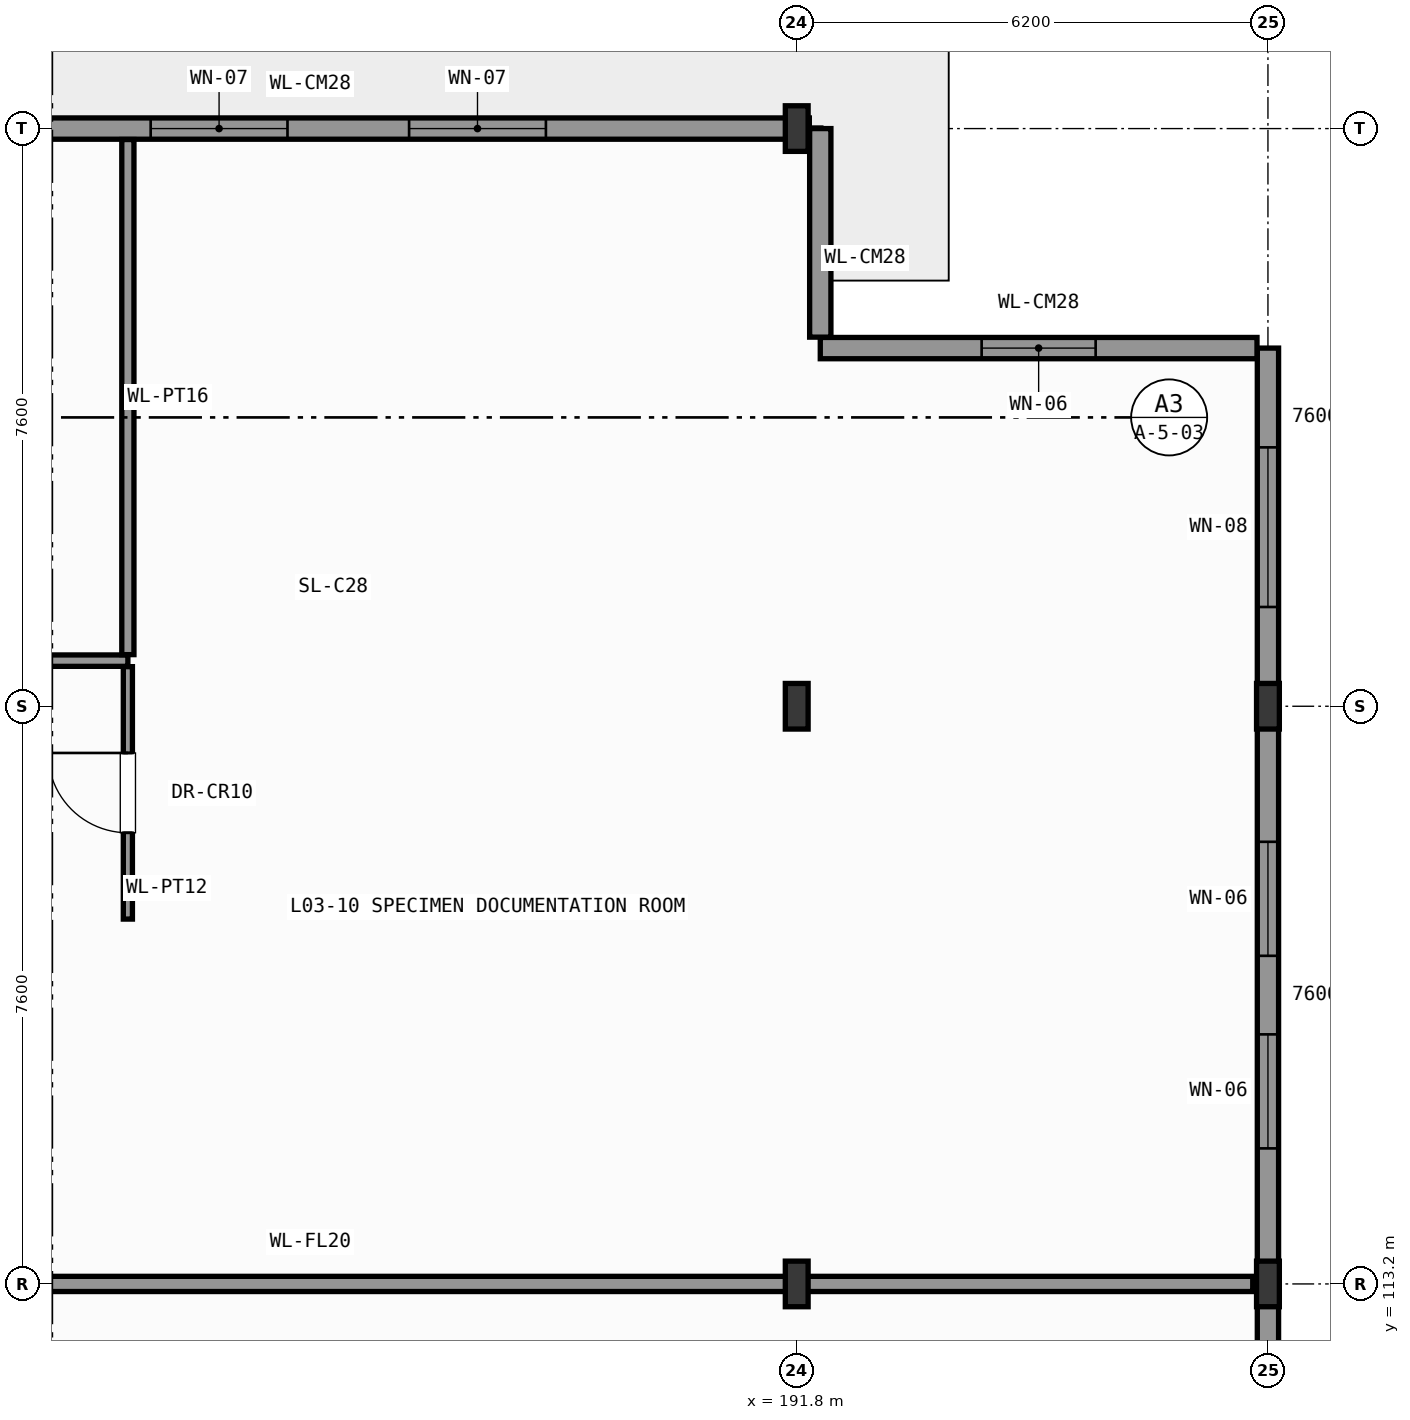
"""IFC4 building model, lengths in metres.
Left out: names, types, materials, properties, quantities, classifications, styles, units other than length and angle.
Written with IfcOpenShell. Run it as: python <this file> out.ifc"""

import sys

from ifc_helpers import new_model, si_unit, direction, frame, frame_2d, origin, origin_2d, place, context, subcontext, project, spatial, rectangle, i_section, extrude, element, fill, save


model = new_model("IFC4")
c1 = context("Model", 3, precision=1e-05, world=origin(), true_north=direction((0.0, 1.0)))
c2 = subcontext(c1, "Body", "Model", "MODEL_VIEW")
j1 = project(units=[si_unit("LENGTHUNIT", "METRE"), si_unit("PLANEANGLEUNIT", "RADIAN")], contexts=[c1])
p1 = place(None, origin())
s1 = spatial("IfcSite", under=j1, at=p1, CompositionType="ELEMENT")
p2 = place(p1, origin())
s2 = spatial("IfcBuilding", under=s1, at=p2, CompositionType="ELEMENT")
p3 = place(p2, frame((0.0, 0.0, 13.2)))
s3 = spatial("IfcBuildingStorey", under=s2, at=p3, CompositionType="ELEMENT", Elevation=13.2)
for number, where, z_axis, x_axis in (
    (1, (191.8, 113.2, 0.0), (0.0, 0.0, 1.0), (1.0, 0.0, 0.0)),
    (2, (191.8, 120.8, 0.0), (0.0, 0.0, 1.0), (1.0, 0.0, 0.0)),
    (3, (191.8, 128.4, 0.0), (0.0, 0.0, 1.0), (1.0, 0.0, 0.0)),
    (4, (198.0, 113.2, 0.0), (0.0, 0.0, 1.0), (1.0, 0.0, 0.0)),
    (5, (198.0, 120.8, 0.0), (0.0, 0.0, 1.0), (1.0, 0.0, 0.0)),
):
    element("IfcColumn", number, at=place(p3, frame(where, z_axis=z_axis, x_axis=x_axis)), inside=s3, PredefinedType="COLUMN", context=c2, shape_type="SweptSolid", body=[
        extrude(i_section(OverallWidth=0.3, OverallDepth=0.6, WebThickness=0.015, FlangeThickness=0.03, FilletRadius=0.027, at=origin_2d()), origin(), (0.0, 0.0, 1.0), 4.8),
    ])
p4 = place(p3, frame((198.0, 113.2, 0.0), z_axis=(0.0, 0.0, 1.0), x_axis=(0.0, -1.0, 0.0)))
e6 = element("IfcWall", 6, at=p4, inside=s3, PredefinedType="SOLIDWALL", context=c2, shape_type="SweptSolid", body=[
    extrude(rectangle(XDim=7.6, YDim=0.28, at=frame_2d((3.8, 0.0))), origin(), (0.0, 0.0, 1.0), 4.215),
])
p5 = place(p4, frame((1.633, 0.0, 0.95)))
e7 = element("IfcOpeningElement", 7, at=p5, cuts=e6, PredefinedType="OPENING", context=c2, shape_type="SweptSolid", body=[
    extrude(rectangle(XDim=1.8, YDim=2.6, at=frame_2d((0.9, 1.3))), frame((0.0, 0.15, 0.0), z_axis=(0.0, -1.0, 0.0), x_axis=(1.0, 0.0, 0.0)), (0.0, 0.0, 1.0), 0.3),
])
p6 = place(p4, frame((4.167, 0.0, 0.95)))
e8 = element("IfcOpeningElement", 8, at=p6, cuts=e6, PredefinedType="OPENING", context=c2, shape_type="SweptSolid", body=[
    extrude(rectangle(XDim=1.8, YDim=2.6, at=frame_2d((0.9, 1.3))), frame((0.0, 0.15, 0.0), z_axis=(0.0, -1.0, 0.0), x_axis=(1.0, 0.0, 0.0)), (0.0, 0.0, 1.0), 0.3),
])
p7 = place(p3, frame((198.0, 120.8, 0.0), z_axis=(0.0, 0.0, 1.0), x_axis=(0.0, -1.0, 0.0)))
e9 = element("IfcWall", 9, at=p7, inside=s3, PredefinedType="SOLIDWALL", context=c2, shape_type="SweptSolid", body=[
    extrude(rectangle(XDim=7.6, YDim=0.28, at=frame_2d((3.8, 0.0))), origin(), (0.0, 0.0, 1.0), 4.56),
])
p8 = place(p7, frame((1.783, 0.0, 0.95)))
e10 = element("IfcOpeningElement", 10, at=p8, cuts=e9, PredefinedType="OPENING", context=c2, shape_type="SweptSolid", body=[
    extrude(rectangle(XDim=1.5, YDim=2.4, at=frame_2d((0.75, 1.2))), frame((0.0, 0.15, 0.0), z_axis=(0.0, -1.0, 0.0), x_axis=(1.0, 0.0, 0.0)), (0.0, 0.0, 1.0), 0.3),
])
p9 = place(p7, frame((4.317, 0.0, 0.95)))
e11 = element("IfcOpeningElement", 11, at=p9, cuts=e9, PredefinedType="OPENING", context=c2, shape_type="SweptSolid", body=[
    extrude(rectangle(XDim=1.5, YDim=2.4, at=frame_2d((0.75, 1.2))), frame((0.0, 0.15, 0.0), z_axis=(0.0, -1.0, 0.0), x_axis=(1.0, 0.0, 0.0)), (0.0, 0.0, 1.0), 0.3),
])
p10 = place(p3, frame((198.0, 125.512, 0.0), z_axis=(0.0, 0.0, 1.0), x_axis=(0.0, -1.0, 0.0)))
e12 = element("IfcWall", 12, at=p10, inside=s3, PredefinedType="SOLIDWALL", context=c2, shape_type="SweptSolid", body=[
    extrude(rectangle(XDim=4.712, YDim=0.28, at=frame_2d((2.356, 0.0))), origin(), (0.0, 0.0, 1.0), 4.56),
])
p11 = place(p10, frame((1.306, 0.0, 0.95)))
e13 = element("IfcOpeningElement", 13, at=p11, cuts=e12, PredefinedType="OPENING", context=c2, shape_type="SweptSolid", body=[
    extrude(rectangle(XDim=2.1, YDim=2.8, at=frame_2d((1.05, 1.4))), frame((0.0, 0.15, 0.0), z_axis=(0.0, -1.0, 0.0), x_axis=(1.0, 0.0, 0.0)), (0.0, 0.0, 1.0), 0.3),
])
p12 = place(p3, frame((192.11, 125.512, 0.0), z_axis=(0.0, 0.0, 1.0), x_axis=(1.0, 0.0, 0.0)))
e14 = element("IfcWall", 14, at=p12, inside=s3, PredefinedType="SOLIDWALL", context=c2, shape_type="SweptSolid", body=[
    extrude(rectangle(XDim=5.746, YDim=0.28, at=frame_2d((2.873, 0.0))), origin(), (0.0, 0.0, 1.0), 4.56),
])
p13 = place(p12, frame((2.123, 0.0, 0.95)))
e15 = element("IfcOpeningElement", 15, at=p13, cuts=e14, PredefinedType="OPENING", context=c2, shape_type="SweptSolid", body=[
    extrude(rectangle(XDim=1.5, YDim=2.4, at=frame_2d((0.75, 1.2))), frame((0.0, 0.15, 0.0), z_axis=(0.0, -1.0, 0.0), x_axis=(1.0, 0.0, 0.0)), (0.0, 0.0, 1.0), 0.3),
])
p14 = place(p3, frame((192.11, 128.4, 0.0), z_axis=(0.0, 0.0, 1.0), x_axis=(0.0, -1.0, 0.0)))
e16 = element("IfcWall", 16, at=p14, inside=s3, PredefinedType="SOLIDWALL", context=c2, shape_type="SweptSolid", body=[
    extrude(rectangle(XDim=2.744, YDim=0.28, at=frame_2d((1.372, 0.0))), origin(), (0.0, 0.0, 1.0), 4.215),
])
p15 = place(p3, frame((179.0, 128.4, 0.0), z_axis=(0.0, 0.0, 1.0), x_axis=(1.0, 0.0, 0.0)))
e17 = element("IfcWall", 17, at=p15, inside=s3, PredefinedType="SOLIDWALL", context=c2, shape_type="SweptSolid", body=[
    extrude(rectangle(XDim=12.966, YDim=0.28, at=frame_2d((6.483, 0.0))), origin(), (0.0, 0.0, 1.0), 4.035),
])
p16 = place(p15, frame((4.3, 0.0, 0.95)))
e18 = element("IfcOpeningElement", 18, at=p16, cuts=e17, PredefinedType="OPENING", context=c2, shape_type="SweptSolid", body=[
    extrude(rectangle(XDim=1.8, YDim=2.6, at=frame_2d((0.9, 1.3))), frame((0.0, 0.15, 0.0), z_axis=(0.0, -1.0, 0.0), x_axis=(1.0, 0.0, 0.0)), (0.0, 0.0, 1.0), 0.3),
])
p17 = place(p15, frame((7.7, 0.0, 0.95)))
e19 = element("IfcOpeningElement", 19, at=p17, cuts=e17, PredefinedType="OPENING", context=c2, shape_type="SweptSolid", body=[
    extrude(rectangle(XDim=1.8, YDim=2.6, at=frame_2d((0.9, 1.3))), frame((0.0, 0.15, 0.0), z_axis=(0.0, -1.0, 0.0), x_axis=(1.0, 0.0, 0.0)), (0.0, 0.0, 1.0), 0.3),
])
p18 = place(p3, frame((170.4, 121.4, 0.0), z_axis=(0.0, 0.0, 1.0), x_axis=(1.0, 0.0, 0.0)))
e20 = element("IfcWall", 20, at=p18, inside=s3, PredefinedType="PARTITIONING", context=c2, shape_type="SweptSolid", body=[
    extrude(rectangle(XDim=12.6, YDim=0.15, at=frame_2d((6.3, 0.0))), origin(), (0.0, 0.0, 1.0), 4.56),
])
p19 = place(p18, frame((5.575, 0.0, 0.0)))
e21 = element("IfcOpeningElement", 21, at=p19, cuts=e20, PredefinedType="OPENING", context=c2, shape_type="SweptSolid", body=[
    extrude(rectangle(XDim=1.45, YDim=2.35, at=frame_2d((0.725, 1.175))), frame((0.0, 0.085, 0.0), z_axis=(0.0, -1.0, 0.0), x_axis=(1.0, 0.0, 0.0)), (0.0, 0.0, 1.0), 0.17),
])
p20 = place(p3, frame((183.0, 118.0, 0.0), z_axis=(0.0, 0.0, 1.0), x_axis=(0.0, 1.0, 0.0)))
e22 = element("IfcWall", 22, at=p20, inside=s3, PredefinedType="PARTITIONING", context=c2, shape_type="SweptSolid", body=[
    extrude(rectangle(XDim=3.321, YDim=0.12, at=frame_2d((1.661, 0.0))), origin(), (0.0, 0.0, 1.0), 4.56),
])
p21 = place(p20, frame((1.135, 0.0, 0.0)))
e23 = element("IfcOpeningElement", 23, at=p21, cuts=e22, PredefinedType="OPENING", context=c2, shape_type="SweptSolid", body=[
    extrude(rectangle(XDim=1.05, YDim=2.2, at=frame_2d((0.525, 1.1))), frame((0.0, 0.07, 0.0), z_axis=(0.0, -1.0, 0.0), x_axis=(1.0, 0.0, 0.0)), (0.0, 0.0, 1.0), 0.14),
])
p22 = place(p3, frame((183.0, 121.479, 0.0), z_axis=(0.0, 0.0, 1.0), x_axis=(0.0, 1.0, 0.0)))
e24 = element("IfcWall", 24, at=p22, inside=s3, PredefinedType="PARTITIONING", context=c2, shape_type="SweptSolid", body=[
    extrude(rectangle(XDim=6.777, YDim=0.16, at=frame_2d((3.389, 0.0))), origin(), (0.0, 0.0, 1.0), 4.56),
])
p23 = place(p3, frame((170.5, 113.2, 0.0), z_axis=(0.0, 0.0, 1.0), x_axis=(1.0, 0.0, 0.0)))
e25 = element("IfcWall", 25, at=p23, inside=s3, PredefinedType="PARTITIONING", context=c2, shape_type="SweptSolid", body=[
    extrude(rectangle(XDim=27.3, YDim=0.2, at=frame_2d((13.65, 0.0))), origin(), (0.0, 0.0, 1.0), 3.805),
])
p24 = place(p8, origin())
e26 = element("IfcWindow", 26, at=p24, inside=s3, PartitioningType="SINGLE_PANEL", PredefinedType="WINDOW", context=c2, shape_type="SweptSolid", body=[
    extrude(rectangle(XDim=1.5, YDim=2.4, at=frame_2d((0.75, 1.2))), frame((0.0, 0.03, 0.0), z_axis=(0.0, -1.0, 0.0), x_axis=(1.0, 0.0, 0.0)), (0.0, 0.0, 1.0), 0.06),
])
fill(e10, e26)
p25 = place(p9, origin())
e27 = element("IfcWindow", 27, at=p25, inside=s3, PartitioningType="SINGLE_PANEL", PredefinedType="WINDOW", context=c2, shape_type="SweptSolid", body=[
    extrude(rectangle(XDim=1.5, YDim=2.4, at=frame_2d((0.75, 1.2))), frame((0.0, 0.03, 0.0), z_axis=(0.0, -1.0, 0.0), x_axis=(1.0, 0.0, 0.0)), (0.0, 0.0, 1.0), 0.06),
])
fill(e11, e27)
p26 = place(p11, origin())
e28 = element("IfcWindow", 28, at=p26, inside=s3, PartitioningType="SINGLE_PANEL", PredefinedType="WINDOW", context=c2, shape_type="SweptSolid", body=[
    extrude(rectangle(XDim=2.1, YDim=2.8, at=frame_2d((1.05, 1.4))), frame((0.0, 0.03, 0.0), z_axis=(0.0, -1.0, 0.0), x_axis=(1.0, 0.0, 0.0)), (0.0, 0.0, 1.0), 0.06),
])
fill(e13, e28)
p27 = place(p13, origin())
e29 = element("IfcWindow", 29, at=p27, inside=s3, PartitioningType="SINGLE_PANEL", PredefinedType="WINDOW", context=c2, shape_type="SweptSolid", body=[
    extrude(rectangle(XDim=1.5, YDim=2.4, at=frame_2d((0.75, 1.2))), frame((0.0, 0.03, 0.0), z_axis=(0.0, -1.0, 0.0), x_axis=(1.0, 0.0, 0.0)), (0.0, 0.0, 1.0), 0.06),
])
fill(e15, e29)
p28 = place(p16, origin())
e30 = element("IfcWindow", 30, at=p28, inside=s3, PartitioningType="SINGLE_PANEL", PredefinedType="WINDOW", context=c2, shape_type="SweptSolid", body=[
    extrude(rectangle(XDim=1.8, YDim=2.6, at=frame_2d((0.9, 1.3))), frame((0.0, 0.03, 0.0), z_axis=(0.0, -1.0, 0.0), x_axis=(1.0, 0.0, 0.0)), (0.0, 0.0, 1.0), 0.06),
])
fill(e18, e30)
p29 = place(p17, origin())
e31 = element("IfcWindow", 31, at=p29, inside=s3, PartitioningType="SINGLE_PANEL", PredefinedType="WINDOW", context=c2, shape_type="SweptSolid", body=[
    extrude(rectangle(XDim=1.8, YDim=2.6, at=frame_2d((0.9, 1.3))), frame((0.0, 0.03, 0.0), z_axis=(0.0, -1.0, 0.0), x_axis=(1.0, 0.0, 0.0)), (0.0, 0.0, 1.0), 0.06),
])
fill(e19, e31)
p30 = place(p21, origin())
e32 = element("IfcDoor", 32, at=p30, inside=s3, OperationType="SINGLE_SWING_RIGHT", PredefinedType="DOOR", context=c2, shape_type="SweptSolid", body=[
    extrude(rectangle(XDim=1.05, YDim=2.2, at=frame_2d((0.525, 1.1))), frame((0.0, 0.025, 0.0), z_axis=(0.0, -1.0, 0.0), x_axis=(1.0, 0.0, 0.0)), (0.0, 0.0, 1.0), 0.05),
])
fill(e23, e32)
save(model, sys.argv[1])
